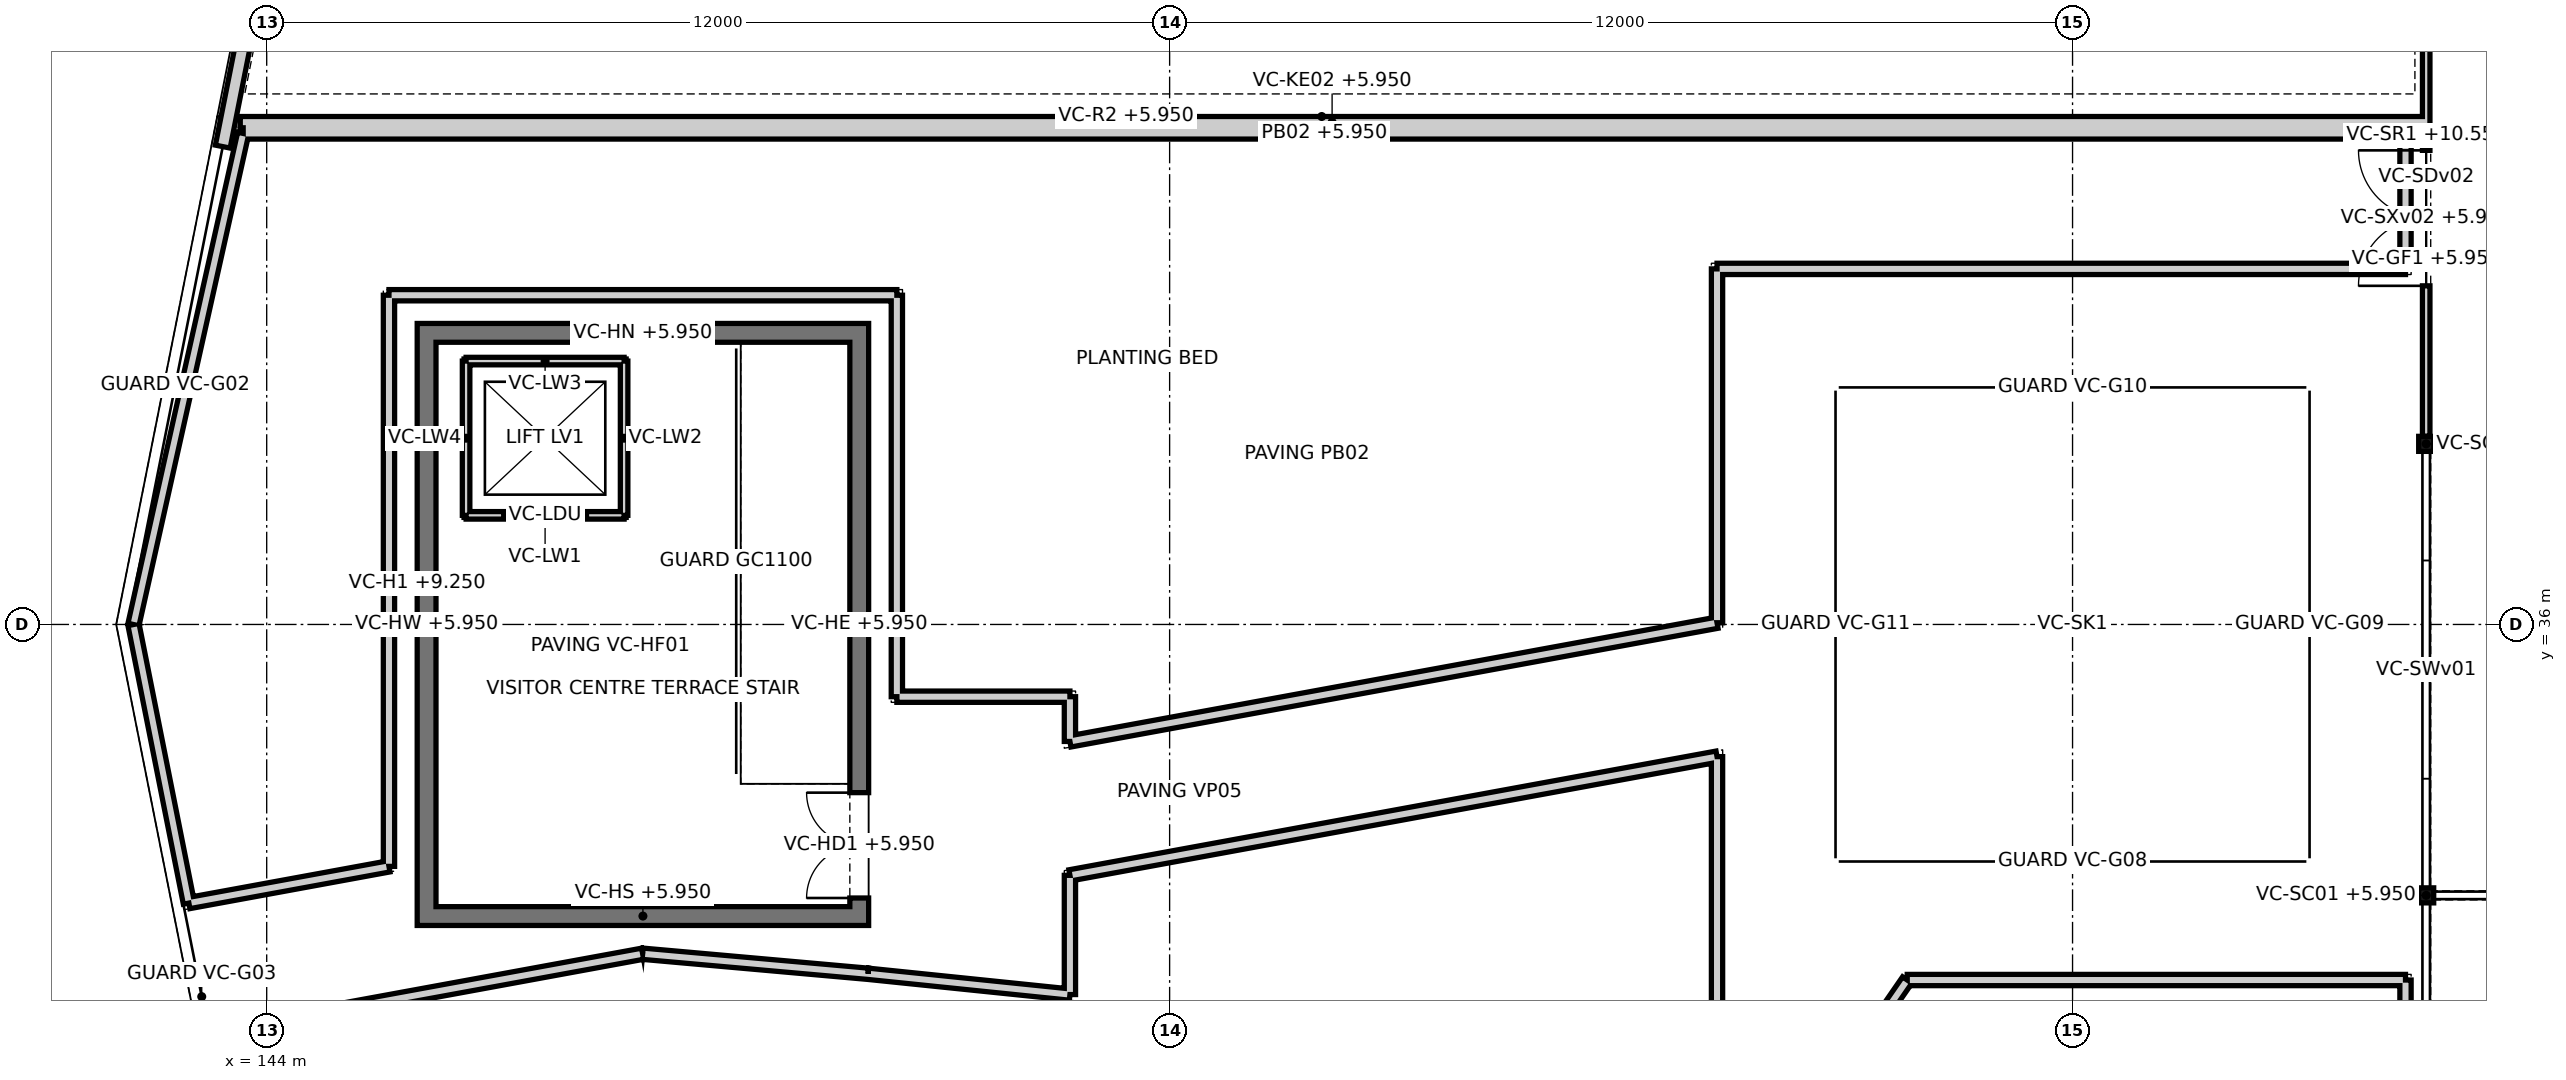
"""IFC4 building model, lengths in metres.
Left out: names, types, materials, properties, quantities, classifications, styles, units other than length and angle.
Written with IfcOpenShell. Run it as: python <this file> out.ifc"""

import sys

from ifc_helpers import new_model, si_unit, direction, frame, frame_2d, origin, origin_2d, place, context, subcontext, project, spatial, polyline, rectangle, hollow_rectangle, outline, extrude, element, fill, save


model = new_model("IFC4")
c1 = context("Model", 3, precision=1e-05, world=origin(), true_north=direction((0.0, 1.0)))
c2 = subcontext(c1, "Body", "Model", "MODEL_VIEW")
j1 = project(units=[si_unit("LENGTHUNIT", "METRE"), si_unit("PLANEANGLEUNIT", "RADIAN")], contexts=[c1])
p1 = place(None, origin())
s1 = spatial("IfcSite", under=j1, at=p1, CompositionType="ELEMENT")
p2 = place(p1, origin())
s2 = spatial("IfcBuilding", under=s1, at=p2, CompositionType="ELEMENT")
p3 = place(p2, frame((0.0, 0.0, 6.0)))
s3 = spatial("IfcBuildingStorey", under=s2, at=p3, CompositionType="ELEMENT", Elevation=6.0)
p4 = place(p3, frame((148.996, 31.625, -0.05), z_axis=(0.0, 0.0, 1.0), x_axis=(-0.983582964216, -0.180456511395, 0.0)))
e1 = element("IfcWall", 1, at=p4, inside=s3, PredefinedType="PARAPET", context=c2, shape_type="SweptSolid", body=[
    extrude(outline(polyline([(-0.01, -0.075), (5.86, -0.075), (5.708, 0.075), (0.01, 0.075), (-0.01, -0.075)])), origin(), (0.0, 0.0, 1.0), 0.5),
])
p5 = place(p3, frame((163.275, 30.693, -0.05), z_axis=(0.0, 0.0, 1.0), x_axis=(0.0, 1.0, 0.0)))
e2 = element("IfcWall", 2, at=p5, inside=s3, PredefinedType="PARAPET", context=c2, shape_type="SweptSolid", body=[
    extrude(outline(polyline([(-0.023, -0.075), (3.641, -0.075), (3.461, 0.075), (0.023, 0.075), (-0.023, -0.075)])), origin(), (0.0, 0.0, 1.0), 0.5),
])
p6 = place(p3, frame((163.275, 34.244, -0.05), z_axis=(0.0, 0.0, 1.0), x_axis=(-0.983586327493, -0.180438178801, 0.0)))
e3 = element("IfcWall", 3, at=p6, inside=s3, PredefinedType="PARAPET", context=c2, shape_type="SweptSolid", body=[
    extrude(outline(polyline([(-0.09, -0.075), (8.806, -0.075), (8.681, 0.075), (0.09, 0.075), (-0.09, -0.075)])), origin(), (0.0, 0.0, 1.0), 0.5),
])
p7 = place(p3, frame((154.675, 32.666, -0.05), z_axis=(0.0, 0.0, 1.0), x_axis=(0.0, -1.0, 0.0)))
e4 = element("IfcWall", 4, at=p7, inside=s3, PredefinedType="PARAPET", context=c2, shape_type="SweptSolid", body=[
    extrude(outline(polyline([(-0.062, -0.075), (1.501, -0.075), (1.667, 0.075), (0.062, 0.075), (-0.062, -0.075)])), origin(), (0.0, 0.0, 1.0), 0.5),
])
p8 = place(p3, frame((154.675, 31.082, -0.05), z_axis=(0.0, 0.0, 1.0), x_axis=(-0.994742485046, 0.102407951082, 0.0)))
e5 = element("IfcWall", 5, at=p8, inside=s3, PredefinedType="PARAPET", context=c2, shape_type="SweptSolid", body=[
    extrude(outline(polyline([(0.083, -0.075), (2.697, -0.075), (2.696, 0.075), (-0.083, 0.075), (0.083, -0.075)])), origin(), (0.0, 0.0, 1.0), 0.5),
])
p9 = place(p3, frame((151.993, 31.358, -0.05), z_axis=(0.0, 0.0, 1.0), x_axis=(-0.996066276854, 0.088611354324, 0.0)))
e6 = element("IfcWall", 6, at=p9, inside=s3, PredefinedType="PARAPET", context=c2, shape_type="SweptSolid", body=[
    extrude(outline(polyline([(-0.0, -0.075), (3.019, -0.075), (2.998, 0.075), (0.0, 0.075), (-0.0, -0.075)])), origin(), (0.0, 0.0, 1.0), 0.5),
])
p10 = place(p3, frame((172.425, 40.725, -0.05), z_axis=(0.0, 0.0, 1.0), x_axis=(0.0, 1.0, 0.0)))
e7 = element("IfcWall", 7, at=p10, inside=s3, PredefinedType="PARAPET", context=c2, shape_type="SweptSolid", body=[
    extrude(outline(polyline([(-0.075, -0.075), (1.875, -0.075), (1.725, 0.075), (0.075, 0.075), (-0.075, -0.075)])), origin(), (0.0, 0.0, 1.0), 0.5),
])
p11 = place(p3, frame((172.425, 42.525, -0.05), z_axis=(0.0, 0.0, 1.0), x_axis=(-1.0, 0.0, 0.0)))
e8 = element("IfcWall", 8, at=p11, inside=s3, PredefinedType="PARAPET", context=c2, shape_type="SweptSolid", body=[
    extrude(outline(polyline([(-0.075, -0.075), (28.798, -0.075), (28.678, 0.075), (0.075, 0.075), (-0.075, -0.075)])), origin(), (0.0, 0.0, 1.0), 0.5),
])
p12 = place(p3, frame((143.687, 42.525, -0.05), z_axis=(0.0, 0.0, 1.0), x_axis=(-0.218008911862, -0.975946778441, 0.0)))
e9 = element("IfcWall", 9, at=p12, inside=s3, PredefinedType="PARAPET", context=c2, shape_type="SweptSolid", body=[
    extrude(outline(polyline([(-0.06, -0.075), (6.703, -0.075), (6.671, 0.075), (0.06, 0.075), (-0.06, -0.075)])), origin(), (0.0, 0.0, 1.0), 0.5),
])
p13 = place(p3, frame((142.229, 35.999, -0.05), z_axis=(0.0, 0.0, 1.0), x_axis=(0.195095964935, -0.98078415794, 0.0)))
e10 = element("IfcWall", 10, at=p13, inside=s3, PredefinedType="PARAPET", context=c2, shape_type="SweptSolid", body=[
    extrude(outline(polyline([(-0.016, -0.075), (3.848, -0.075), (3.7, 0.075), (0.016, 0.075), (-0.016, -0.075)])), origin(), (0.0, 0.0, 1.0), 0.5),
])
p14 = place(p3, frame((142.966, 32.297, -0.05), z_axis=(0.0, 0.0, 1.0), x_axis=(0.983588399423, 0.180426884139, 0.0)))
e11 = element("IfcWall", 11, at=p14, inside=s3, PredefinedType="PARAPET", context=c2, shape_type="SweptSolid", body=[
    extrude(outline(polyline([(-0.074, -0.075), (2.766, -0.075), (2.641, 0.075), (0.074, 0.075), (-0.074, -0.075)])), origin(), (0.0, 0.0, 1.0), 0.5),
])
p15 = place(p3, frame((145.625, 32.785, -0.05), z_axis=(0.0, 0.0, 1.0), x_axis=(0.0, 1.0, 0.0)))
e12 = element("IfcWall", 12, at=p15, inside=s3, PredefinedType="PARAPET", context=c2, shape_type="SweptSolid", body=[
    extrude(outline(polyline([(-0.062, -0.075), (7.515, -0.075), (7.665, 0.075), (0.062, 0.075), (-0.062, -0.075)])), origin(), (0.0, 0.0, 1.0), 0.5),
])
p16 = place(p3, frame((145.625, 40.375, -0.05), z_axis=(0.0, 0.0, 1.0), x_axis=(1.0, 0.0, 0.0)))
e13 = element("IfcWall", 13, at=p16, inside=s3, PredefinedType="PARAPET", context=c2, shape_type="SweptSolid", body=[
    extrude(outline(polyline([(0.075, -0.075), (6.675, -0.075), (6.825, 0.075), (-0.075, 0.075), (0.075, -0.075)])), origin(), (0.0, 0.0, 1.0), 0.5),
])
p17 = place(p3, frame((152.375, 40.375, -0.05), z_axis=(0.0, 0.0, 1.0), x_axis=(0.0, -1.0, 0.0)))
e14 = element("IfcWall", 14, at=p17, inside=s3, PredefinedType="PARAPET", context=c2, shape_type="SweptSolid", body=[
    extrude(outline(polyline([(0.075, -0.075), (5.41, -0.075), (5.26, 0.075), (-0.075, 0.075), (0.075, -0.075)])), origin(), (0.0, 0.0, 1.0), 0.5),
])
p18 = place(p3, frame((152.375, 35.04, -0.05), z_axis=(0.0, 0.0, 1.0), x_axis=(1.0, 0.0, 0.0)))
e15 = element("IfcWall", 15, at=p18, inside=s3, PredefinedType="PARAPET", context=c2, shape_type="SweptSolid", body=[
    extrude(outline(polyline([(-0.075, -0.075), (2.225, -0.075), (2.375, 0.075), (0.075, 0.075), (-0.075, -0.075)])), origin(), (0.0, 0.0, 1.0), 0.5),
])
p19 = place(p3, frame((154.675, 35.04, -0.05), z_axis=(0.0, 0.0, 1.0), x_axis=(0.0, -1.0, 0.0)))
e16 = element("IfcWall", 16, at=p19, inside=s3, PredefinedType="PARAPET", context=c2, shape_type="SweptSolid", body=[
    extrude(outline(polyline([(0.075, -0.075), (0.685, -0.075), (0.505, 0.075), (-0.075, 0.075), (0.075, -0.075)])), origin(), (0.0, 0.0, 1.0), 0.5),
])
p20 = place(p3, frame((154.675, 34.445, -0.05), z_axis=(0.0, 0.0, 1.0), x_axis=(0.983586327493, 0.180438178801, 0.0)))
e17 = element("IfcWall", 17, at=p20, inside=s3, PredefinedType="PARAPET", context=c2, shape_type="SweptSolid", body=[
    extrude(outline(polyline([(-0.09, -0.075), (8.806, -0.075), (8.681, 0.075), (0.09, 0.075), (-0.09, -0.075)])), origin(), (0.0, 0.0, 1.0), 0.5),
])
p21 = place(p3, frame((163.275, 36.023, -0.05), z_axis=(0.0, 0.0, 1.0), x_axis=(0.0, 1.0, 0.0)))
e18 = element("IfcWall", 18, at=p21, inside=s3, PredefinedType="PARAPET", context=c2, shape_type="SweptSolid", body=[
    extrude(outline(polyline([(-0.062, -0.075), (4.627, -0.075), (4.777, 0.075), (0.062, 0.075), (-0.062, -0.075)])), origin(), (0.0, 0.0, 1.0), 0.5),
])
p22 = place(p3, frame((163.275, 40.725, -0.05), z_axis=(0.0, 0.0, 1.0), x_axis=(1.0, 0.0, 0.0)))
e19 = element("IfcWall", 19, at=p22, inside=s3, PredefinedType="PARAPET", context=c2, shape_type="SweptSolid", body=[
    extrude(outline(polyline([(0.075, -0.075), (9.225, -0.075), (9.075, 0.075), (-0.075, 0.075), (0.075, -0.075)])), origin(), (0.0, 0.0, 1.0), 0.5),
])
p23 = place(p3, frame((172.425, 26.125, -0.05), z_axis=(0.0, 0.0, 1.0), x_axis=(0.0, 1.0, 0.0)))
e20 = element("IfcWall", 20, at=p23, inside=s3, PredefinedType="PARAPET", context=c2, shape_type="SweptSolid", body=[
    extrude(outline(polyline([(0.075, -0.075), (5.225, -0.075), (5.075, 0.075), (-0.075, 0.075), (0.075, -0.075)])), origin(), (0.0, 0.0, 1.0), 0.5),
])
p24 = place(p3, frame((172.425, 31.275, -0.05), z_axis=(0.0, 0.0, 1.0), x_axis=(-1.0, 0.0, 0.0)))
e21 = element("IfcWall", 21, at=p24, inside=s3, PredefinedType="PARAPET", context=c2, shape_type="SweptSolid", body=[
    extrude(outline(polyline([(-0.075, -0.075), (6.661, -0.075), (6.583, 0.075), (0.075, 0.075), (-0.075, -0.075)])), origin(), (0.0, 0.0, 1.0), 0.5),
])
p25 = place(p3, frame((165.803, 31.275, -0.05), z_axis=(0.0, 0.0, 1.0), x_axis=(-0.567933729625, -0.823074285076, 0.0)))
e22 = element("IfcWall", 22, at=p25, inside=s3, PredefinedType="PARAPET", context=c2, shape_type="SweptSolid", body=[
    extrude(outline(polyline([(-0.039, -0.075), (7.189, -0.075), (6.904, 0.075), (0.039, 0.075), (-0.039, -0.075)])), origin(), (0.0, 0.0, 1.0), 0.5),
])
p26 = place(p3, frame((143.649, 42.675, -0.05), z_axis=(0.0, 0.0, 1.0), x_axis=(1.0, 0.0, 0.0)))
e23 = element("IfcWall", 23, at=p26, inside=s3, PredefinedType="PARAPET", context=c2, shape_type="SweptSolid", body=[
    extrude(rectangle(XDim=29.021, YDim=0.15, at=frame_2d((14.511, 0.0))), origin(), (0.0, 0.0, 1.0), 0.5),
])
p27 = place(p3, frame((144.12, 45.891, -0.05), z_axis=(0.0, 0.0, 1.0), x_axis=(-0.195075759432, -0.980788176969, 0.0)))
e24 = element("IfcWall", 24, at=p27, inside=s3, PredefinedType="PARAPET", context=c2, shape_type="SweptSolid", body=[
    extrude(outline(polyline([(-0.02, -0.1), (3.611, -0.1), (3.611, 0.1), (0.02, 0.1), (-0.02, -0.1)])), origin(), (0.0, 0.0, 1.0), 1.1),
])
p28 = place(p3, frame((151.875, 32.0, -0.05), z_axis=(0.0, 0.0, 1.0), x_axis=(0.0, 1.0, 0.0)))
e25 = element("IfcWall", 25, at=p28, inside=s3, PredefinedType="SOLIDWALL", context=c2, shape_type="SweptSolid", body=[
    extrude(rectangle(XDim=8.0, YDim=0.25, at=frame_2d((4.0, 0.0))), origin(), (0.0, 0.0, 1.0), 3.0),
])
p29 = place(p28, frame((0.365, 0.0, 0.0)))
e26 = element("IfcOpeningElement", 26, at=p29, cuts=e25, PredefinedType="OPENING", context=c2, shape_type="SweptSolid", body=[
    extrude(rectangle(XDim=1.4, YDim=2.2, at=frame_2d((0.7, 1.1))), frame((0.0, 0.135, 0.0), z_axis=(0.0, -1.0, 0.0), x_axis=(1.0, 0.0, 0.0)), (0.0, 0.0, 1.0), 0.27),
])
p30 = place(p3, frame((146.125, 32.0, -0.05), z_axis=(0.0, 0.0, 1.0), x_axis=(0.0, 1.0, 0.0)))
e27 = element("IfcWall", 27, at=p30, inside=s3, PredefinedType="SOLIDWALL", context=c2, shape_type="SweptSolid", body=[
    extrude(rectangle(XDim=8.0, YDim=0.25, at=frame_2d((4.0, 0.0))), origin(), (0.0, 0.0, 1.0), 3.0),
])
for number, where, z_axis, x_axis in (
    (28, (146.25, 32.125, -0.05), (0.0, 0.0, 1.0), (1.0, 0.0, 0.0)),
    (29, (146.25, 39.875, -0.05), (0.0, 0.0, 1.0), (1.0, 0.0, 0.0)),
):
    element("IfcWall", number, at=place(p3, frame(where, z_axis=z_axis, x_axis=x_axis)), inside=s3, PredefinedType="SOLIDWALL", context=c2, shape_type="SweptSolid", body=[
        extrude(rectangle(XDim=5.5, YDim=0.25, at=frame_2d((2.75, 0.0))), origin(), (0.0, 0.0, 1.0), 3.0),
    ])
for number, where, z_axis, x_axis in (
    (30, (172.7, 32.4, -0.05), (0.0, 0.0, 1.0), (1.0, 0.0, 0.0)),
    (31, (172.7, 38.4, -0.05), (0.0, 0.0, 1.0), (1.0, 0.0, 0.0)),
):
    element("IfcColumn", number, at=place(p3, frame(where, z_axis=z_axis, x_axis=x_axis)), inside=s3, PredefinedType="COLUMN", context=c2, shape_type="SweptSolid", body=[
        extrude(hollow_rectangle(XDim=0.2, YDim=0.2, WallThickness=0.01, at=origin_2d()), origin(), (0.0, 0.0, 1.0), 4.21),
    ])
p31 = place(p3, frame((172.7, 38.5, -0.05), z_axis=(0.0, 0.0, 1.0), x_axis=(0.0, 1.0, 0.0)))
e32 = element("IfcWall", 32, at=p31, inside=s3, PredefinedType="PARTITIONING", context=c2, shape_type="SweptSolid", body=[
    extrude(rectangle(XDim=5.8, YDim=0.1, at=frame_2d((2.9, 0.0))), origin(), (0.0, 0.0, 1.0), 4.21),
])
p32 = place(p31, frame((2.0, 0.0, 0.05)))
e33 = element("IfcOpeningElement", 33, at=p32, cuts=e32, PredefinedType="OPENING", context=c2, shape_type="SweptSolid", body=[
    extrude(rectangle(XDim=1.8, YDim=2.4, at=frame_2d((0.9, 1.2))), frame((0.0, 0.06, 0.0), z_axis=(0.0, -1.0, 0.0), x_axis=(1.0, 0.0, 0.0)), (0.0, 0.0, 1.0), 0.12),
])
p33 = place(p3, frame((146.65, 37.45, 0.0), z_axis=(0.0, 0.0, 1.0), x_axis=(1.0, 0.0, 0.0)))
e34 = element("IfcWall", 34, at=p33, inside=s3, PredefinedType="PARTITIONING", context=c2, shape_type="SweptSolid", body=[
    extrude(outline(polyline([(-0.05, -0.05), (2.15, -0.05), (2.05, 0.05), (0.05, 0.05), (-0.05, -0.05)])), origin(), (0.0, 0.0, 1.0), 3.2),
])
p34 = place(p33, frame((0.5, 0.0, 0.0)))
e35 = element("IfcOpeningElement", 35, at=p34, cuts=e34, PredefinedType="OPENING", context=c2, shape_type="SweptSolid", body=[
    extrude(rectangle(XDim=1.1, YDim=2.1, at=frame_2d((0.55, 1.05))), frame((0.0, 0.06, 0.0), z_axis=(0.0, -1.0, 0.0), x_axis=(1.0, 0.0, 0.0)), (0.0, 0.0, 1.0), 0.12),
])
p35 = place(p3, frame((148.75, 37.45, 0.0), z_axis=(0.0, 0.0, 1.0), x_axis=(0.0, 1.0, 0.0)))
e36 = element("IfcWall", 36, at=p35, inside=s3, PredefinedType="PARTITIONING", context=c2, shape_type="SweptSolid", body=[
    extrude(outline(polyline([(-0.05, -0.05), (2.1, -0.05), (2.0, 0.05), (0.05, 0.05), (-0.05, -0.05)])), origin(), (0.0, 0.0, 1.0), 3.2),
])
p36 = place(p3, frame((148.75, 39.5, 0.0), z_axis=(0.0, 0.0, 1.0), x_axis=(-1.0, 0.0, 0.0)))
e37 = element("IfcWall", 37, at=p36, inside=s3, PredefinedType="PARTITIONING", context=c2, shape_type="SweptSolid", body=[
    extrude(outline(polyline([(-0.05, -0.05), (2.15, -0.05), (2.05, 0.05), (0.05, 0.05), (-0.05, -0.05)])), origin(), (0.0, 0.0, 1.0), 3.2),
])
p37 = place(p3, frame((146.65, 39.5, 0.0), z_axis=(0.0, 0.0, 1.0), x_axis=(0.0, -1.0, 0.0)))
e38 = element("IfcWall", 38, at=p37, inside=s3, PredefinedType="PARTITIONING", context=c2, shape_type="SweptSolid", body=[
    extrude(outline(polyline([(-0.05, -0.05), (2.1, -0.05), (2.0, 0.05), (0.05, 0.05), (-0.05, -0.05)])), origin(), (0.0, 0.0, 1.0), 3.2),
])
p38 = place(p3, frame((0.0, 0.0, -0.451)))
p39 = place(p38, frame((168.0, 36.0, 0.0)))
p40 = place(p39, frame((0.0, 0.0, 0.351)))
e39 = element("IfcWindow", 39, at=p40, inside=s3, PartitioningType="SINGLE_PANEL", PredefinedType="SKYLIGHT", context=c2, shape_type="SweptSolid", body=[
    extrude(rectangle(XDim=5.6, YDim=5.6, at=origin_2d()), origin(), (0.0, 0.0, 1.0), 0.05),
])
p41 = place(p29, origin())
e40 = element("IfcDoor", 40, at=p41, inside=s3, OperationType="DOUBLE_DOOR_SINGLE_SWING", PredefinedType="DOOR", context=c2, shape_type="SweptSolid", body=[
    extrude(rectangle(XDim=1.4, YDim=2.2, at=frame_2d((0.7, 1.1))), frame((0.0, 0.025, 0.0), z_axis=(0.0, -1.0, 0.0), x_axis=(1.0, 0.0, 0.0)), (0.0, 0.0, 1.0), 0.05),
])
fill(e26, e40)
p42 = place(p32, origin())
e41 = element("IfcDoor", 41, at=p42, inside=s3, OperationType="DOUBLE_DOOR_SINGLE_SWING", PredefinedType="DOOR", context=c2, shape_type="SweptSolid", body=[
    extrude(rectangle(XDim=1.8, YDim=2.4, at=frame_2d((0.9, 1.2))), frame((0.0, 0.025, 0.0), z_axis=(0.0, -1.0, 0.0), x_axis=(1.0, 0.0, 0.0)), (0.0, 0.0, 1.0), 0.05),
])
fill(e33, e41)
p43 = place(p34, origin())
e42 = element("IfcDoor", 42, at=p43, inside=s3, OperationType="DOUBLE_DOOR_SLIDING", PredefinedType="DOOR", context=c2, shape_type="SweptSolid", body=[
    extrude(rectangle(XDim=1.1, YDim=2.1, at=frame_2d((0.55, 1.05))), frame((0.0, 0.025, 0.0), z_axis=(0.0, -1.0, 0.0), x_axis=(1.0, 0.0, 0.0)), (0.0, 0.0, 1.0), 0.05),
])
fill(e35, e42)
save(model, sys.argv[1])
